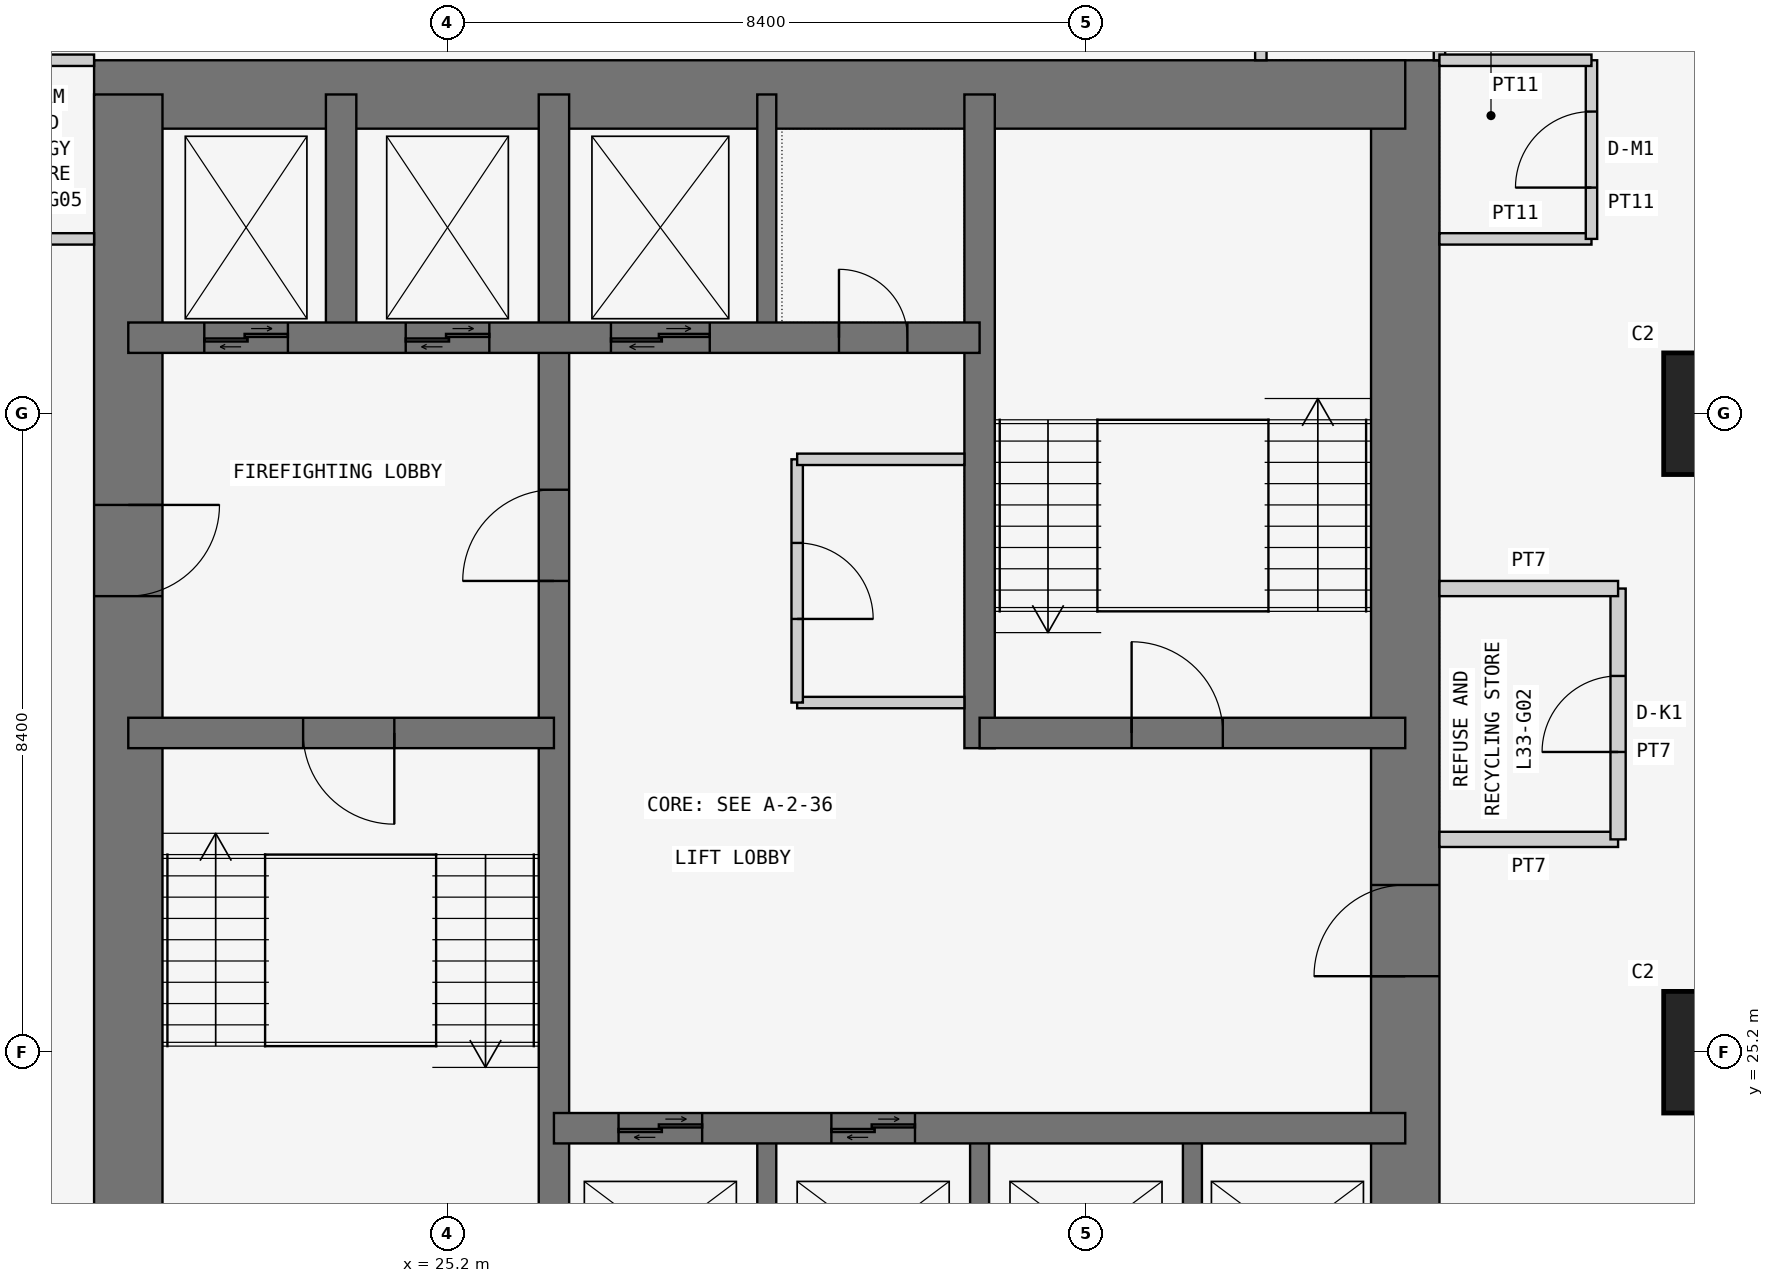
"""IFC4 building model, lengths in metres.
Left out: names, types, materials, properties, quantities, classifications, styles, units other than length and angle.
Written with IfcOpenShell. Run it as: python <this file> out.ifc"""

import sys

from ifc_helpers import new_model, si_unit, direction, frame, frame_2d, origin, origin_2d, place, context, subcontext, project, spatial, rectangle, extrude, element, fill, save


model = new_model("IFC4")
c1 = context("Model", 3, precision=1e-05, world=origin(), true_north=direction((0.0, 1.0)))
c2 = subcontext(c1, "Body", "Model", "MODEL_VIEW")
j1 = project(units=[si_unit("LENGTHUNIT", "METRE"), si_unit("PLANEANGLEUNIT", "RADIAN")], contexts=[c1])
p1 = place(None, origin())
s1 = spatial("IfcSite", under=j1, at=p1, CompositionType="ELEMENT")
p2 = place(p1, origin())
s2 = spatial("IfcBuilding", under=s1, at=p2, CompositionType="ELEMENT")
p3 = place(p2, frame((0.0, 0.0, 130.5)))
s3 = spatial("IfcBuildingStorey", under=s2, at=p3, CompositionType="ELEMENT", Elevation=130.5)
for number, where, z_axis, x_axis in (
    (1, (42.0, 25.2, 0.0), (0.0, 0.0, 1.0), (1.0, 0.0, 0.0)),
    (2, (42.0, 33.6, 0.0), (0.0, 0.0, 1.0), (1.0, 0.0, 0.0)),
):
    element("IfcColumn", number, at=place(p3, frame(where, z_axis=z_axis, x_axis=x_axis)), inside=s3, PredefinedType="COLUMN", context=c2, shape_type="SweptSolid", body=[
        extrude(rectangle(XDim=1.6, YDim=1.6, at=origin_2d()), origin(), (0.0, 0.0, 1.0), 3.6),
    ])
p4 = place(p3, frame((37.8, 21.0, 0.0), z_axis=(0.0, 0.0, 1.0), x_axis=(0.0, 1.0, 0.0)))
e3 = element("IfcWall", 3, at=p4, inside=s3, PredefinedType="SHEAR", context=c2, shape_type="SweptSolid", body=[
    extrude(rectangle(XDim=17.25, YDim=0.9, at=frame_2d((8.625, 0.0))), origin(), (0.0, 0.0, 1.0), 3.6),
])
p5 = place(p4, frame((5.2, 0.0, 0.0)))
e4 = element("IfcOpeningElement", 4, at=p5, cuts=e3, PredefinedType="OPENING", context=c2, shape_type="SweptSolid", body=[
    extrude(rectangle(XDim=1.2, YDim=2.1, at=frame_2d((0.6, 1.05))), frame((0.0, 0.46, 0.0), z_axis=(0.0, -1.0, 0.0), x_axis=(1.0, 0.0, 0.0)), (0.0, 0.0, 1.0), 0.92),
])
p6 = place(p3, frame((37.8, 37.8, 0.0), z_axis=(0.0, 0.0, 1.0), x_axis=(-1.0, 0.0, 0.0)))
e5 = element("IfcWall", 5, at=p6, inside=s3, PredefinedType="SHEAR", context=c2, shape_type="SweptSolid", body=[
    extrude(rectangle(XDim=17.25, YDim=0.9, at=frame_2d((8.625, 0.0))), origin(), (0.0, 0.0, 1.0), 3.6),
])
p7 = place(p3, frame((21.0, 37.8, 0.0), z_axis=(0.0, 0.0, 1.0), x_axis=(0.0, -1.0, 0.0)))
e6 = element("IfcWall", 6, at=p7, inside=s3, PredefinedType="SHEAR", context=c2, shape_type="SweptSolid", body=[
    extrude(rectangle(XDim=17.25, YDim=0.9, at=frame_2d((8.625, 0.0))), origin(), (0.0, 0.0, 1.0), 3.6),
])
p8 = place(p7, frame((5.4, 0.0, 0.0)))
e7 = element("IfcOpeningElement", 7, at=p8, cuts=e6, PredefinedType="OPENING", context=c2, shape_type="SweptSolid", body=[
    extrude(rectangle(XDim=1.2, YDim=2.1, at=frame_2d((0.6, 1.05))), frame((0.0, 0.46, 0.0), z_axis=(0.0, -1.0, 0.0), x_axis=(1.0, 0.0, 0.0)), (0.0, 0.0, 1.0), 0.92),
])
p9 = place(p3, frame((26.6, 21.0, 0.0), z_axis=(0.0, 0.0, 1.0), x_axis=(0.0, 1.0, 0.0)))
e8 = element("IfcWall", 8, at=p9, inside=s3, PredefinedType="SHEAR", context=c2, shape_type="SweptSolid", body=[
    extrude(rectangle(XDim=16.8, YDim=0.4, at=frame_2d((8.4, 0.0))), origin(), (0.0, 0.0, 1.0), 3.6),
])
p10 = place(p9, frame((10.4, 0.0, 0.0)))
e9 = element("IfcOpeningElement", 9, at=p10, cuts=e8, PredefinedType="OPENING", context=c2, shape_type="SweptSolid", body=[
    extrude(rectangle(XDim=1.2, YDim=2.1, at=frame_2d((0.6, 1.05))), frame((0.0, 0.21, 0.0), z_axis=(0.0, -1.0, 0.0), x_axis=(1.0, 0.0, 0.0)), (0.0, 0.0, 1.0), 0.42),
])
p11 = place(p3, frame((21.0, 29.4, 0.0), z_axis=(0.0, 0.0, 1.0), x_axis=(1.0, 0.0, 0.0)))
e10 = element("IfcWall", 10, at=p11, inside=s3, PredefinedType="SHEAR", context=c2, shape_type="SweptSolid", body=[
    extrude(rectangle(XDim=5.6, YDim=0.4, at=frame_2d((2.8, 0.0))), origin(), (0.0, 0.0, 1.0), 3.6),
])
p12 = place(p11, frame((2.3, 0.0, 0.0)))
e11 = element("IfcOpeningElement", 11, at=p12, cuts=e10, PredefinedType="OPENING", context=c2, shape_type="SweptSolid", body=[
    extrude(rectangle(XDim=1.2, YDim=2.1, at=frame_2d((0.6, 1.05))), frame((0.0, 0.21, 0.0), z_axis=(0.0, -1.0, 0.0), x_axis=(1.0, 0.0, 0.0)), (0.0, 0.0, 1.0), 0.42),
])
p13 = place(p3, frame((21.0, 34.6, 0.0), z_axis=(0.0, 0.0, 1.0), x_axis=(1.0, 0.0, 0.0)))
e12 = element("IfcWall", 12, at=p13, inside=s3, PredefinedType="SHEAR", context=c2, shape_type="SweptSolid", body=[
    extrude(rectangle(XDim=11.2, YDim=0.4, at=frame_2d((5.6, 0.0))), origin(), (0.0, 0.0, 1.0), 3.6),
])
p14 = place(p13, frame((9.35, 0.0, 0.0)))
e13 = element("IfcOpeningElement", 13, at=p14, cuts=e12, PredefinedType="OPENING", context=c2, shape_type="SweptSolid", body=[
    extrude(rectangle(XDim=0.9, YDim=2.1, at=frame_2d((0.45, 1.05))), frame((0.0, 0.21, 0.0), z_axis=(0.0, -1.0, 0.0), x_axis=(1.0, 0.0, 0.0)), (0.0, 0.0, 1.0), 0.42),
])
p15 = place(p13, frame((1.0, 0.0, 0.0)))
e14 = element("IfcOpeningElement", 14, at=p15, cuts=e12, PredefinedType="OPENING", context=c2, shape_type="SweptSolid", body=[
    extrude(rectangle(XDim=1.1, YDim=2.1, at=frame_2d((0.55, 1.05))), frame((0.0, 0.21, 0.0), z_axis=(0.0, -1.0, 0.0), x_axis=(1.0, 0.0, 0.0)), (0.0, 0.0, 1.0), 0.42),
])
p16 = place(p13, frame((3.65, 0.0, 0.0)))
e15 = element("IfcOpeningElement", 15, at=p16, cuts=e12, PredefinedType="OPENING", context=c2, shape_type="SweptSolid", body=[
    extrude(rectangle(XDim=1.1, YDim=2.1, at=frame_2d((0.55, 1.05))), frame((0.0, 0.21, 0.0), z_axis=(0.0, -1.0, 0.0), x_axis=(1.0, 0.0, 0.0)), (0.0, 0.0, 1.0), 0.42),
])
p17 = place(p13, frame((6.35, 0.0, 0.0)))
e16 = element("IfcOpeningElement", 16, at=p17, cuts=e12, PredefinedType="OPENING", context=c2, shape_type="SweptSolid", body=[
    extrude(rectangle(XDim=1.3, YDim=2.1, at=frame_2d((0.65, 1.05))), frame((0.0, 0.21, 0.0), z_axis=(0.0, -1.0, 0.0), x_axis=(1.0, 0.0, 0.0)), (0.0, 0.0, 1.0), 0.42),
])
p18 = place(p3, frame((23.8, 34.6, 0.0), z_axis=(0.0, 0.0, 1.0), x_axis=(0.0, 1.0, 0.0)))
e17 = element("IfcWall", 17, at=p18, inside=s3, PredefinedType="SHEAR", context=c2, shape_type="SweptSolid", body=[
    extrude(rectangle(XDim=3.2, YDim=0.4, at=frame_2d((1.6, 0.0))), origin(), (0.0, 0.0, 1.0), 3.6),
])
p19 = place(p3, frame((26.6, 24.2, 0.0), z_axis=(0.0, 0.0, 1.0), x_axis=(1.0, 0.0, 0.0)))
e18 = element("IfcWall", 18, at=p19, inside=s3, PredefinedType="SHEAR", context=c2, shape_type="SweptSolid", body=[
    extrude(rectangle(XDim=11.2, YDim=0.4, at=frame_2d((5.6, 0.0))), origin(), (0.0, 0.0, 1.0), 3.6),
])
p20 = place(p19, frame((0.85, 0.0, 0.0)))
e19 = element("IfcOpeningElement", 19, at=p20, cuts=e18, PredefinedType="OPENING", context=c2, shape_type="SweptSolid", body=[
    extrude(rectangle(XDim=1.1, YDim=2.1, at=frame_2d((0.55, 1.05))), frame((0.0, 0.21, 0.0), z_axis=(0.0, -1.0, 0.0), x_axis=(1.0, 0.0, 0.0)), (0.0, 0.0, 1.0), 0.42),
])
p21 = place(p19, frame((3.65, 0.0, 0.0)))
e20 = element("IfcOpeningElement", 20, at=p21, cuts=e18, PredefinedType="OPENING", context=c2, shape_type="SweptSolid", body=[
    extrude(rectangle(XDim=1.1, YDim=2.1, at=frame_2d((0.55, 1.05))), frame((0.0, 0.21, 0.0), z_axis=(0.0, -1.0, 0.0), x_axis=(1.0, 0.0, 0.0)), (0.0, 0.0, 1.0), 0.42),
])
p22 = place(p3, frame((32.2, 29.2, 0.0), z_axis=(0.0, 0.0, 1.0), x_axis=(0.0, 1.0, 0.0)))
e21 = element("IfcWall", 21, at=p22, inside=s3, PredefinedType="SHEAR", context=c2, shape_type="SweptSolid", body=[
    extrude(rectangle(XDim=8.6, YDim=0.4, at=frame_2d((4.3, 0.0))), origin(), (0.0, 0.0, 1.0), 3.6),
])
p23 = place(p3, frame((32.2, 29.4, 0.0), z_axis=(0.0, 0.0, 1.0), x_axis=(1.0, 0.0, 0.0)))
e22 = element("IfcWall", 22, at=p23, inside=s3, PredefinedType="SHEAR", context=c2, shape_type="SweptSolid", body=[
    extrude(rectangle(XDim=5.6, YDim=0.4, at=frame_2d((2.8, 0.0))), origin(), (0.0, 0.0, 1.0), 3.6),
])
p24 = place(p23, frame((2.0, 0.0, 0.0)))
e23 = element("IfcOpeningElement", 23, at=p24, cuts=e22, PredefinedType="OPENING", context=c2, shape_type="SweptSolid", body=[
    extrude(rectangle(XDim=1.2, YDim=2.1, at=frame_2d((0.6, 1.05))), frame((0.0, 0.21, 0.0), z_axis=(0.0, -1.0, 0.0), x_axis=(1.0, 0.0, 0.0)), (0.0, 0.0, 1.0), 0.42),
])
for number, where, z_axis, x_axis in (
    (24, (29.4, 21.0, 0.0), (0.0, 0.0, 1.0), (0.0, 1.0, 0.0)),
    (25, (32.2, 21.0, 0.0), (0.0, 0.0, 1.0), (0.0, 1.0, 0.0)),
    (26, (35.0, 21.0, 0.0), (0.0, 0.0, 1.0), (0.0, 1.0, 0.0)),
    (27, (29.4, 34.6, 0.0), (0.0, 0.0, 1.0), (0.0, 1.0, 0.0)),
):
    element("IfcWall", number, at=place(p3, frame(where, z_axis=z_axis, x_axis=x_axis)), inside=s3, PredefinedType="SHEAR", context=c2, shape_type="SweptSolid", body=[
        extrude(rectangle(XDim=3.2, YDim=0.25, at=frame_2d((1.6, 0.0))), origin(), (0.0, 0.0, 1.0), 3.6),
    ])
for number, where, z_axis, x_axis in (
    (28, (38.25, 38.25, 0.0), (0.0, 0.0, 1.0), (0.0, 1.0, 0.0)),
    (29, (35.9, 40.6, 0.0), (0.0, 0.0, 1.0), (0.0, -1.0, 0.0)),
):
    element("IfcWall", number, at=place(p3, frame(where, z_axis=z_axis, x_axis=x_axis)), inside=s3, PredefinedType="PARTITIONING", context=c2, shape_type="SweptSolid", body=[
        extrude(rectangle(XDim=2.35, YDim=0.15, at=frame_2d((1.175, 0.0))), origin(), (0.0, 0.0, 1.0), 3.45),
    ])
p25 = place(p3, frame((38.25, 28.0, 0.0), z_axis=(0.0, 0.0, 1.0), x_axis=(1.0, 0.0, 0.0)))
e30 = element("IfcWall", 30, at=p25, inside=s3, PredefinedType="PARTITIONING", context=c2, shape_type="SweptSolid", body=[
    extrude(rectangle(XDim=2.35, YDim=0.2, at=frame_2d((1.175, 0.0))), origin(), (0.0, 0.0, 1.0), 3.45),
])
p26 = place(p3, frame((40.6, 28.0, 0.0), z_axis=(0.0, 0.0, 1.0), x_axis=(0.0, 1.0, 0.0)))
e31 = element("IfcWall", 31, at=p26, inside=s3, PredefinedType="PARTITIONING", context=c2, shape_type="SweptSolid", body=[
    extrude(rectangle(XDim=3.3, YDim=0.2, at=frame_2d((1.65, 0.0))), origin(), (0.0, 0.0, 1.0), 3.45),
])
p27 = place(p26, frame((1.15, 0.0, 0.0)))
e32 = element("IfcOpeningElement", 32, at=p27, cuts=e31, PredefinedType="OPENING", context=c2, shape_type="SweptSolid", body=[
    extrude(rectangle(XDim=1.0, YDim=2.1, at=frame_2d((0.5, 1.05))), frame((0.0, 0.11, 0.0), z_axis=(0.0, -1.0, 0.0), x_axis=(1.0, 0.0, 0.0)), (0.0, 0.0, 1.0), 0.22),
])
p28 = place(p3, frame((40.6, 31.3, 0.0), z_axis=(0.0, 0.0, 1.0), x_axis=(-1.0, 0.0, 0.0)))
e33 = element("IfcWall", 33, at=p28, inside=s3, PredefinedType="PARTITIONING", context=c2, shape_type="SweptSolid", body=[
    extrude(rectangle(XDim=2.35, YDim=0.2, at=frame_2d((1.175, 0.0))), origin(), (0.0, 0.0, 1.0), 3.45),
])
p29 = place(p3, frame((38.25, 35.9, 0.0), z_axis=(0.0, 0.0, 1.0), x_axis=(1.0, 0.0, 0.0)))
e34 = element("IfcWall", 34, at=p29, inside=s3, PredefinedType="PARTITIONING", context=c2, shape_type="SweptSolid", body=[
    extrude(rectangle(XDim=2.0, YDim=0.15, at=frame_2d((1.0, 0.0))), origin(), (0.0, 0.0, 1.0), 3.45),
])
p30 = place(p3, frame((40.25, 35.9, 0.0), z_axis=(0.0, 0.0, 1.0), x_axis=(0.0, 1.0, 0.0)))
e35 = element("IfcWall", 35, at=p30, inside=s3, PredefinedType="PARTITIONING", context=c2, shape_type="SweptSolid", body=[
    extrude(rectangle(XDim=2.35, YDim=0.15, at=frame_2d((1.175, 0.0))), origin(), (0.0, 0.0, 1.0), 3.45),
])
p31 = place(p30, frame((0.675, 0.0, 0.0)))
e36 = element("IfcOpeningElement", 36, at=p31, cuts=e35, PredefinedType="OPENING", context=c2, shape_type="SweptSolid", body=[
    extrude(rectangle(XDim=1.0, YDim=2.1, at=frame_2d((0.5, 1.05))), frame((0.0, 0.085, 0.0), z_axis=(0.0, -1.0, 0.0), x_axis=(1.0, 0.0, 0.0)), (0.0, 0.0, 1.0), 0.17),
])
p32 = place(p3, frame((40.25, 38.25, 0.0), z_axis=(0.0, 0.0, 1.0), x_axis=(-1.0, 0.0, 0.0)))
e37 = element("IfcWall", 37, at=p32, inside=s3, PredefinedType="PARTITIONING", context=c2, shape_type="SweptSolid", body=[
    extrude(rectangle(XDim=2.0, YDim=0.15, at=frame_2d((1.0, 0.0))), origin(), (0.0, 0.0, 1.0), 3.45),
])
for number, where, z_axis, x_axis in (
    (38, (20.55, 38.25, 0.0), (0.0, 0.0, 1.0), (-1.0, 0.0, 0.0)),
    (39, (18.2, 35.9, 0.0), (0.0, 0.0, 1.0), (1.0, 0.0, 0.0)),
):
    element("IfcWall", number, at=place(p3, frame(where, z_axis=z_axis, x_axis=x_axis)), inside=s3, PredefinedType="PARTITIONING", context=c2, shape_type="SweptSolid", body=[
        extrude(rectangle(XDim=2.35, YDim=0.15, at=frame_2d((1.175, 0.0))), origin(), (0.0, 0.0, 1.0), 3.45),
    ])
p33 = place(p3, frame((32.0, 29.8, 0.0), z_axis=(0.0, 0.0, 1.0), x_axis=(-1.0, 0.0, 0.0)))
e40 = element("IfcWall", 40, at=p33, inside=s3, PredefinedType="PARTITIONING", context=c2, shape_type="SweptSolid", body=[
    extrude(rectangle(XDim=2.2, YDim=0.15, at=frame_2d((1.1, 0.0))), origin(), (0.0, 0.0, 1.0), 3.45),
])
p34 = place(p3, frame((29.8, 29.8, 0.0), z_axis=(0.0, 0.0, 1.0), x_axis=(0.0, 1.0, 0.0)))
e41 = element("IfcWall", 41, at=p34, inside=s3, PredefinedType="PARTITIONING", context=c2, shape_type="SweptSolid", body=[
    extrude(rectangle(XDim=3.2, YDim=0.15, at=frame_2d((1.6, 0.0))), origin(), (0.0, 0.0, 1.0), 3.45),
])
p35 = place(p34, frame((1.1, 0.0, 0.0)))
e42 = element("IfcOpeningElement", 42, at=p35, cuts=e41, PredefinedType="OPENING", context=c2, shape_type="SweptSolid", body=[
    extrude(rectangle(XDim=1.0, YDim=2.1, at=frame_2d((0.5, 1.05))), frame((0.0, 0.085, 0.0), z_axis=(0.0, -1.0, 0.0), x_axis=(1.0, 0.0, 0.0)), (0.0, 0.0, 1.0), 0.17),
])
p36 = place(p3, frame((29.8, 33.0, 0.0), z_axis=(0.0, 0.0, 1.0), x_axis=(1.0, 0.0, 0.0)))
e43 = element("IfcWall", 43, at=p36, inside=s3, PredefinedType="PARTITIONING", context=c2, shape_type="SweptSolid", body=[
    extrude(rectangle(XDim=2.2, YDim=0.15, at=frame_2d((1.1, 0.0))), origin(), (0.0, 0.0, 1.0), 3.45),
])
p37 = place(p27, origin())
e44 = element("IfcDoor", 44, at=p37, inside=s3, OperationType="SINGLE_SWING_LEFT", PredefinedType="DOOR", context=c2, shape_type="SweptSolid", body=[
    extrude(rectangle(XDim=1.0, YDim=2.1, at=frame_2d((0.5, 1.05))), frame((0.0, 0.025, 0.0), z_axis=(0.0, -1.0, 0.0), x_axis=(1.0, 0.0, 0.0)), (0.0, 0.0, 1.0), 0.05),
])
fill(e32, e44)
p38 = place(p31, origin())
e45 = element("IfcDoor", 45, at=p38, inside=s3, OperationType="SINGLE_SWING_LEFT", PredefinedType="DOOR", context=c2, shape_type="SweptSolid", body=[
    extrude(rectangle(XDim=1.0, YDim=2.1, at=frame_2d((0.5, 1.05))), frame((0.0, 0.025, 0.0), z_axis=(0.0, -1.0, 0.0), x_axis=(1.0, 0.0, 0.0)), (0.0, 0.0, 1.0), 0.05),
])
fill(e36, e45)
p39 = place(p8, origin())
e46 = element("IfcDoor", 46, at=p39, inside=s3, OperationType="SINGLE_SWING_LEFT", PredefinedType="DOOR", context=c2, shape_type="SweptSolid", body=[
    extrude(rectangle(XDim=1.2, YDim=2.1, at=frame_2d((0.6, 1.05))), frame((0.0, 0.025, 0.0), z_axis=(0.0, -1.0, 0.0), x_axis=(1.0, 0.0, 0.0)), (0.0, 0.0, 1.0), 0.05),
])
fill(e7, e46)
p40 = place(p12, frame((1.2, 0.0, 0.0), z_axis=(0.0, 0.0, 1.0), x_axis=(-1.0, 0.0, 0.0)))
e47 = element("IfcDoor", 47, at=p40, inside=s3, OperationType="SINGLE_SWING_LEFT", PredefinedType="DOOR", context=c2, shape_type="SweptSolid", body=[
    extrude(rectangle(XDim=1.2, YDim=2.1, at=frame_2d((0.6, 1.05))), frame((0.0, 0.025, 0.0), z_axis=(0.0, -1.0, 0.0), x_axis=(1.0, 0.0, 0.0)), (0.0, 0.0, 1.0), 0.05),
])
fill(e11, e47)
p41 = place(p10, origin())
e48 = element("IfcDoor", 48, at=p41, inside=s3, OperationType="SINGLE_SWING_LEFT", PredefinedType="DOOR", context=c2, shape_type="SweptSolid", body=[
    extrude(rectangle(XDim=1.2, YDim=2.1, at=frame_2d((0.6, 1.05))), frame((0.0, 0.025, 0.0), z_axis=(0.0, -1.0, 0.0), x_axis=(1.0, 0.0, 0.0)), (0.0, 0.0, 1.0), 0.05),
])
fill(e9, e48)
p42 = place(p5, origin())
e49 = element("IfcDoor", 49, at=p42, inside=s3, OperationType="SINGLE_SWING_LEFT", PredefinedType="DOOR", context=c2, shape_type="SweptSolid", body=[
    extrude(rectangle(XDim=1.2, YDim=2.1, at=frame_2d((0.6, 1.05))), frame((0.0, 0.025, 0.0), z_axis=(0.0, -1.0, 0.0), x_axis=(1.0, 0.0, 0.0)), (0.0, 0.0, 1.0), 0.05),
])
fill(e4, e49)
p43 = place(p24, origin())
e50 = element("IfcDoor", 50, at=p43, inside=s3, OperationType="SINGLE_SWING_LEFT", PredefinedType="DOOR", context=c2, shape_type="SweptSolid", body=[
    extrude(rectangle(XDim=1.2, YDim=2.1, at=frame_2d((0.6, 1.05))), frame((0.0, 0.025, 0.0), z_axis=(0.0, -1.0, 0.0), x_axis=(1.0, 0.0, 0.0)), (0.0, 0.0, 1.0), 0.05),
])
fill(e23, e50)
p44 = place(p14, origin())
e51 = element("IfcDoor", 51, at=p44, inside=s3, OperationType="SINGLE_SWING_LEFT", PredefinedType="DOOR", context=c2, shape_type="SweptSolid", body=[
    extrude(rectangle(XDim=0.9, YDim=2.1, at=frame_2d((0.45, 1.05))), frame((0.0, 0.025, 0.0), z_axis=(0.0, -1.0, 0.0), x_axis=(1.0, 0.0, 0.0)), (0.0, 0.0, 1.0), 0.05),
])
fill(e13, e51)
p45 = place(p35, frame((1.0, 0.0, 0.0), z_axis=(0.0, 0.0, 1.0), x_axis=(-1.0, 0.0, 0.0)))
e52 = element("IfcDoor", 52, at=p45, inside=s3, OperationType="SINGLE_SWING_RIGHT", PredefinedType="DOOR", context=c2, shape_type="SweptSolid", body=[
    extrude(rectangle(XDim=1.0, YDim=2.1, at=frame_2d((0.5, 1.05))), frame((0.0, 0.025, 0.0), z_axis=(0.0, -1.0, 0.0), x_axis=(1.0, 0.0, 0.0)), (0.0, 0.0, 1.0), 0.05),
])
fill(e42, e52)
p46 = place(p20, origin())
e53 = element("IfcDoor", 53, at=p46, inside=s3, OperationType="DOUBLE_DOOR_SLIDING", PredefinedType="DOOR", context=c2, shape_type="SweptSolid", body=[
    extrude(rectangle(XDim=1.1, YDim=2.1, at=frame_2d((0.55, 1.05))), frame((0.0, 0.025, 0.0), z_axis=(0.0, -1.0, 0.0), x_axis=(1.0, 0.0, 0.0)), (0.0, 0.0, 1.0), 0.05),
])
fill(e19, e53)
p47 = place(p21, origin())
e54 = element("IfcDoor", 54, at=p47, inside=s3, OperationType="DOUBLE_DOOR_SLIDING", PredefinedType="DOOR", context=c2, shape_type="SweptSolid", body=[
    extrude(rectangle(XDim=1.1, YDim=2.1, at=frame_2d((0.55, 1.05))), frame((0.0, 0.025, 0.0), z_axis=(0.0, -1.0, 0.0), x_axis=(1.0, 0.0, 0.0)), (0.0, 0.0, 1.0), 0.05),
])
fill(e20, e54)
p48 = place(p15, origin())
e55 = element("IfcDoor", 55, at=p48, inside=s3, OperationType="DOUBLE_DOOR_SLIDING", PredefinedType="DOOR", context=c2, shape_type="SweptSolid", body=[
    extrude(rectangle(XDim=1.1, YDim=2.1, at=frame_2d((0.55, 1.05))), frame((0.0, 0.025, 0.0), z_axis=(0.0, -1.0, 0.0), x_axis=(1.0, 0.0, 0.0)), (0.0, 0.0, 1.0), 0.05),
])
fill(e14, e55)
p49 = place(p16, origin())
e56 = element("IfcDoor", 56, at=p49, inside=s3, OperationType="DOUBLE_DOOR_SLIDING", PredefinedType="DOOR", context=c2, shape_type="SweptSolid", body=[
    extrude(rectangle(XDim=1.1, YDim=2.1, at=frame_2d((0.55, 1.05))), frame((0.0, 0.025, 0.0), z_axis=(0.0, -1.0, 0.0), x_axis=(1.0, 0.0, 0.0)), (0.0, 0.0, 1.0), 0.05),
])
fill(e15, e56)
p50 = place(p17, origin())
e57 = element("IfcDoor", 57, at=p50, inside=s3, OperationType="DOUBLE_DOOR_SLIDING", PredefinedType="DOOR", context=c2, shape_type="SweptSolid", body=[
    extrude(rectangle(XDim=1.3, YDim=2.1, at=frame_2d((0.65, 1.05))), frame((0.0, 0.025, 0.0), z_axis=(0.0, -1.0, 0.0), x_axis=(1.0, 0.0, 0.0)), (0.0, 0.0, 1.0), 0.05),
])
fill(e16, e57)
save(model, sys.argv[1])
